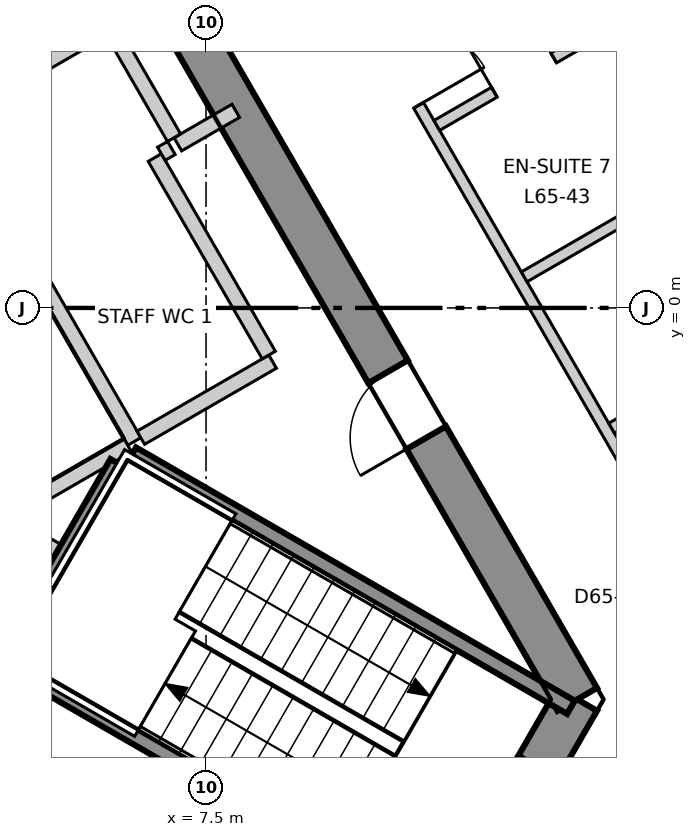
"""IFC4 building model, lengths in metres.
Left out: names, types, materials, properties, quantities, classifications, styles, units other than length and angle.
Written with IfcOpenShell. Run it as: python <this file> out.ifc"""

import sys

from ifc_helpers import new_model, si_unit, direction, frame, frame_2d, origin, place, context, subcontext, project, spatial, polyline, rectangle, outline, extrude, element, fill, save


model = new_model("IFC4")
c1 = context("Model", 3, precision=1e-05, world=origin(), true_north=direction((0.0, 1.0)))
c2 = subcontext(c1, "Body", "Model", "MODEL_VIEW")
j1 = project(units=[si_unit("LENGTHUNIT", "METRE"), si_unit("PLANEANGLEUNIT", "RADIAN")], contexts=[c1])
p1 = place(None, origin())
s1 = spatial("IfcSite", under=j1, at=p1, CompositionType="ELEMENT")
p2 = place(p1, origin())
s2 = spatial("IfcBuilding", under=s1, at=p2, CompositionType="ELEMENT")
p3 = place(p2, frame((0.0, 0.0, 279.1)))
s3 = spatial("IfcBuildingStorey", under=s2, at=p3, CompositionType="ELEMENT", Elevation=279.1)
p4 = place(p3, frame((10.652, -8.15, -0.3), z_axis=(0.0, 0.0, 1.0), x_axis=(0.49997462182, 0.866040055388, 0.0)))
e1 = element("IfcWall", 1, at=p4, inside=s3, PredefinedType="SHEAR", context=c2, shape_type="SweptSolid", body=[
    extrude(outline(polyline([(-0.173, -0.3), (1.732, -0.301), (3.638, -0.301), (3.291, 0.3), (1.732, 0.3), (0.173, 0.3), (-0.173, -0.3)])), origin(), (0.0, 0.0, 1.0), 3.6),
])
p5 = place(p4, frame((1.032, 0.0, 0.3)))
e2 = element("IfcOpeningElement", 2, at=p5, cuts=e1, PredefinedType="OPENING", context=c2, shape_type="SweptSolid", body=[
    extrude(rectangle(XDim=1.4, YDim=2.1, at=frame_2d((0.7, 1.05))), frame((0.0, 0.31, 0.0), z_axis=(0.0, -1.0, 0.0), x_axis=(1.0, 0.0, 0.0)), (0.0, 0.0, 1.0), 0.621),
])
p6 = place(p3, frame((12.384, -5.15, -0.3), z_axis=(0.0, 0.0, 1.0), x_axis=(-0.500000539815, 0.866025092122, 0.0)))
e3 = element("IfcWall", 3, at=p6, inside=s3, PredefinedType="SHEAR", context=c2, shape_type="SweptSolid", body=[
    extrude(outline(polyline([(-0.173, -0.301), (1.795, -0.301), (3.763, -0.301), (5.731, -0.301), (7.7, -0.301), (9.668, -0.301), (11.636, -0.301), (13.604, -0.3), (15.573, -0.3), (17.541, -0.3), (19.509, -0.3), (21.477, -0.3), (21.131, 0.3), (19.226, 0.3), (17.321, 0.3), (15.415, 0.3), (13.51, 0.3), (11.605, 0.3), (9.699, 0.3), (7.794, 0.3), (5.889, 0.3), (3.984, 0.3), (2.078, 0.3), (0.173, 0.3), (-0.173, -0.301)])), origin(), (0.0, 0.0, 1.0), 3.6),
])
p7 = place(p6, frame((16.378, 0.0, 0.3)))
e4 = element("IfcOpeningElement", 4, at=p7, cuts=e3, PredefinedType="OPENING", context=c2, shape_type="SweptSolid", body=[
    extrude(rectangle(XDim=0.9, YDim=2.1, at=frame_2d((0.45, 1.05))), frame((0.0, 0.31, 0.0), z_axis=(0.0, -1.0, 0.0), x_axis=(1.0, 0.0, 0.0)), (0.0, 0.0, 1.0), 0.621),
])
p8 = place(p6, frame((3.976, 0.0, 0.3)))
e5 = element("IfcOpeningElement", 5, at=p8, cuts=e3, PredefinedType="OPENING", context=c2, shape_type="SweptSolid", body=[
    extrude(rectangle(XDim=1.0, YDim=2.1, at=frame_2d((0.5, 1.05))), frame((0.0, 0.31, 0.0), z_axis=(0.0, -1.0, 0.0), x_axis=(1.0, 0.0, 0.0)), (0.0, 0.0, 1.0), 0.621),
])
p9 = place(p3, frame((25.791, -11.962, 0.0), z_axis=(0.0, 0.0, 1.0), x_axis=(-0.500006870765, 0.86602143691, 0.0)))
e6 = element("IfcWall", 6, at=p9, inside=s3, PredefinedType="ELEMENTEDWALL", context=c2, shape_type="SweptSolid", body=[
    extrude(rectangle(XDim=46.49, YDim=0.2, at=frame_2d((23.245, 0.0))), origin(), (0.0, 0.0, 1.0), 3.3),
])
p10 = place(p9, frame((2.197, 0.0, 0.9)))
e7 = element("IfcOpeningElement", 7, at=p10, cuts=e6, PredefinedType="OPENING", context=c2, shape_type="SweptSolid", body=[
    extrude(rectangle(XDim=3.7, YDim=2.2, at=frame_2d((1.85, 1.1))), frame((0.0, 0.11, 0.0), z_axis=(0.0, -1.0, 0.0), x_axis=(1.0, 0.0, 0.0)), (0.0, 0.0, 1.0), 0.22),
])
p11 = place(p9, frame((7.685, 0.0, 0.9)))
e8 = element("IfcOpeningElement", 8, at=p11, cuts=e6, PredefinedType="OPENING", context=c2, shape_type="SweptSolid", body=[
    extrude(rectangle(XDim=3.7, YDim=2.2, at=frame_2d((1.85, 1.1))), frame((0.0, 0.11, 0.0), z_axis=(0.0, -1.0, 0.0), x_axis=(1.0, 0.0, 0.0)), (0.0, 0.0, 1.0), 0.22),
])
p12 = place(p9, frame((13.173, 0.0, 0.9)))
e9 = element("IfcOpeningElement", 9, at=p12, cuts=e6, PredefinedType="OPENING", context=c2, shape_type="SweptSolid", body=[
    extrude(rectangle(XDim=3.7, YDim=2.2, at=frame_2d((1.85, 1.1))), frame((0.0, 0.11, 0.0), z_axis=(0.0, -1.0, 0.0), x_axis=(1.0, 0.0, 0.0)), (0.0, 0.0, 1.0), 0.22),
])
p13 = place(p9, frame((18.661, 0.0, 0.9)))
e10 = element("IfcOpeningElement", 10, at=p13, cuts=e6, PredefinedType="OPENING", context=c2, shape_type="SweptSolid", body=[
    extrude(rectangle(XDim=3.7, YDim=2.2, at=frame_2d((1.85, 1.1))), frame((0.0, 0.11, 0.0), z_axis=(0.0, -1.0, 0.0), x_axis=(1.0, 0.0, 0.0)), (0.0, 0.0, 1.0), 0.22),
])
p14 = place(p9, frame((24.149, 0.0, 0.9)))
e11 = element("IfcOpeningElement", 11, at=p14, cuts=e6, PredefinedType="OPENING", context=c2, shape_type="SweptSolid", body=[
    extrude(rectangle(XDim=3.7, YDim=2.2, at=frame_2d((1.85, 1.1))), frame((0.0, 0.11, 0.0), z_axis=(0.0, -1.0, 0.0), x_axis=(1.0, 0.0, 0.0)), (0.0, 0.0, 1.0), 0.22),
])
p15 = place(p9, frame((29.637, 0.0, 0.9)))
e12 = element("IfcOpeningElement", 12, at=p15, cuts=e6, PredefinedType="OPENING", context=c2, shape_type="SweptSolid", body=[
    extrude(rectangle(XDim=3.7, YDim=2.2, at=frame_2d((1.85, 1.1))), frame((0.0, 0.11, 0.0), z_axis=(0.0, -1.0, 0.0), x_axis=(1.0, 0.0, 0.0)), (0.0, 0.0, 1.0), 0.22),
])
p16 = place(p9, frame((35.125, 0.0, 0.9)))
e13 = element("IfcOpeningElement", 13, at=p16, cuts=e6, PredefinedType="OPENING", context=c2, shape_type="SweptSolid", body=[
    extrude(rectangle(XDim=3.7, YDim=2.2, at=frame_2d((1.85, 1.1))), frame((0.0, 0.11, 0.0), z_axis=(0.0, -1.0, 0.0), x_axis=(1.0, 0.0, 0.0)), (0.0, 0.0, 1.0), 0.22),
])
p17 = place(p9, frame((40.613, 0.0, 0.9)))
e14 = element("IfcOpeningElement", 14, at=p17, cuts=e6, PredefinedType="OPENING", context=c2, shape_type="SweptSolid", body=[
    extrude(rectangle(XDim=3.7, YDim=2.2, at=frame_2d((1.85, 1.1))), frame((0.0, 0.11, 0.0), z_axis=(0.0, -1.0, 0.0), x_axis=(1.0, 0.0, 0.0)), (0.0, 0.0, 1.0), 0.22),
])
p18 = place(p3, frame((0.075, 20.37, 0.0), z_axis=(0.0, 0.0, 1.0), x_axis=(0.500003985697, -0.866023102629, 0.0)))
e15 = element("IfcWall", 15, at=p18, inside=s3, PredefinedType="PARTITIONING", context=c2, shape_type="SweptSolid", body=[
    extrude(rectangle(XDim=35.206, YDim=0.15, at=frame_2d((17.603, 0.0))), origin(), (0.0, 0.0, 1.0), 3.3),
])
p19 = place(p18, frame((31.506, 0.0, 0.0)))
e16 = element("IfcOpeningElement", 16, at=p19, cuts=e15, PredefinedType="OPENING", context=c2, shape_type="SweptSolid", body=[
    extrude(rectangle(XDim=1.0, YDim=2.1, at=frame_2d((0.5, 1.05))), frame((0.0, 0.085, 0.0), z_axis=(0.0, -1.0, 0.0), x_axis=(1.0, 0.0, 0.0)), (0.0, 0.0, 1.0), 0.17),
])
p20 = place(p18, frame((26.529, 0.0, 0.0)))
e17 = element("IfcOpeningElement", 17, at=p20, cuts=e15, PredefinedType="OPENING", context=c2, shape_type="SweptSolid", body=[
    extrude(rectangle(XDim=1.0, YDim=2.1, at=frame_2d((0.5, 1.05))), frame((0.0, 0.085, 0.0), z_axis=(0.0, -1.0, 0.0), x_axis=(1.0, 0.0, 0.0)), (0.0, 0.0, 1.0), 0.17),
])
p21 = place(p18, frame((19.442, 0.0, 0.0)))
e18 = element("IfcOpeningElement", 18, at=p21, cuts=e15, PredefinedType="OPENING", context=c2, shape_type="SweptSolid", body=[
    extrude(rectangle(XDim=1.0, YDim=2.1, at=frame_2d((0.5, 1.05))), frame((0.0, 0.085, 0.0), z_axis=(0.0, -1.0, 0.0), x_axis=(1.0, 0.0, 0.0)), (0.0, 0.0, 1.0), 0.17),
])
p22 = place(p18, frame((8.254, 0.0, 0.0)))
e19 = element("IfcOpeningElement", 19, at=p22, cuts=e15, PredefinedType="OPENING", context=c2, shape_type="SweptSolid", body=[
    extrude(rectangle(XDim=1.0, YDim=2.1, at=frame_2d((0.5, 1.05))), frame((0.0, 0.085, 0.0), z_axis=(0.0, -1.0, 0.0), x_axis=(1.0, 0.0, 0.0)), (0.0, 0.0, 1.0), 0.17),
])
p23 = place(p18, frame((13.754, 0.0, 0.0)))
e20 = element("IfcOpeningElement", 20, at=p23, cuts=e15, PredefinedType="OPENING", context=c2, shape_type="SweptSolid", body=[
    extrude(rectangle(XDim=0.9, YDim=2.1, at=frame_2d((0.45, 1.05))), frame((0.0, 0.085, 0.0), z_axis=(0.0, -1.0, 0.0), x_axis=(1.0, 0.0, 0.0)), (0.0, 0.0, 1.0), 0.17),
])
p24 = place(p18, frame((11.554, 0.0, 0.0)))
e21 = element("IfcOpeningElement", 21, at=p24, cuts=e15, PredefinedType="OPENING", context=c2, shape_type="SweptSolid", body=[
    extrude(rectangle(XDim=0.9, YDim=2.1, at=frame_2d((0.45, 1.05))), frame((0.0, 0.085, 0.0), z_axis=(0.0, -1.0, 0.0), x_axis=(1.0, 0.0, 0.0)), (0.0, 0.0, 1.0), 0.17),
])
p25 = place(p18, frame((2.777, 0.0, 0.0)))
e22 = element("IfcOpeningElement", 22, at=p25, cuts=e15, PredefinedType="OPENING", context=c2, shape_type="SweptSolid", body=[
    extrude(rectangle(XDim=1.0, YDim=2.1, at=frame_2d((0.5, 1.05))), frame((0.0, 0.085, 0.0), z_axis=(0.0, -1.0, 0.0), x_axis=(1.0, 0.0, 0.0)), (0.0, 0.0, 1.0), 0.17),
])
p26 = place(p3, frame((11.686, 0.409, 0.0), z_axis=(0.0, 0.0, 1.0), x_axis=(0.865976450533, 0.500084779935, 0.0)))
e23 = element("IfcWall", 23, at=p26, inside=s3, PredefinedType="PARTITIONING", context=c2, shape_type="SweptSolid", body=[
    extrude(rectangle(XDim=5.949, YDim=0.15, at=frame_2d((2.975, 0.0))), origin(), (0.0, 0.0, 1.0), 3.3),
])
p27 = place(p3, frame((12.809, 3.714, 0.0), z_axis=(0.0, 0.0, 1.0), x_axis=(0.500162441854, -0.865931597621, 0.0)))
e24 = element("IfcWall", 24, at=p27, inside=s3, PredefinedType="PARTITIONING", context=c2, shape_type="SweptSolid", body=[
    extrude(rectangle(XDim=2.225, YDim=0.15, at=frame_2d((1.113, 0.0))), origin(), (0.0, 0.0, 1.0), 3.3),
])
p28 = place(p3, frame((12.836, -1.582, 0.0), z_axis=(0.0, 0.0, 1.0), x_axis=(0.865965520905, 0.500103705848, 0.0)))
e25 = element("IfcWall", 25, at=p28, inside=s3, PredefinedType="PARTITIONING", context=c2, shape_type="SweptSolid", body=[
    extrude(rectangle(XDim=2.55, YDim=0.15, at=frame_2d((1.275, 0.0))), origin(), (0.0, 0.0, 1.0), 3.3),
])
p29 = place(p28, frame((0.775, 0.0, 0.0)))
e26 = element("IfcOpeningElement", 26, at=p29, cuts=e25, PredefinedType="OPENING", context=c2, shape_type="SweptSolid", body=[
    extrude(rectangle(XDim=0.9, YDim=2.1, at=frame_2d((0.45, 1.05))), frame((0.0, 0.085, 0.0), z_axis=(0.0, -1.0, 0.0), x_axis=(1.0, 0.0, 0.0)), (0.0, 0.0, 1.0), 0.17),
])
p30 = place(p3, frame((10.536, 2.401, 0.0), z_axis=(0.0, 0.0, 1.0), x_axis=(0.865965520905, 0.500103705848, 0.0)))
e27 = element("IfcWall", 27, at=p30, inside=s3, PredefinedType="PARTITIONING", context=c2, shape_type="SweptSolid", body=[
    extrude(rectangle(XDim=2.55, YDim=0.15, at=frame_2d((1.275, 0.0))), origin(), (0.0, 0.0, 1.0), 3.3),
])
p31 = place(p30, frame((0.875, 0.0, 0.0)))
e28 = element("IfcOpeningElement", 28, at=p31, cuts=e27, PredefinedType="OPENING", context=c2, shape_type="SweptSolid", body=[
    extrude(rectangle(XDim=0.9, YDim=2.1, at=frame_2d((0.45, 1.05))), frame((0.0, 0.085, 0.0), z_axis=(0.0, -1.0, 0.0), x_axis=(1.0, 0.0, 0.0)), (0.0, 0.0, 1.0), 0.17),
])
p32 = place(p3, frame((1.578, 2.874, 0.0), z_axis=(0.0, 0.0, 1.0), x_axis=(0.866045911672, 0.499964477614, 0.0)))
e29 = element("IfcWall", 29, at=p32, inside=s3, PredefinedType="SOLIDWALL", context=c2, shape_type="SweptSolid", body=[
    extrude(rectangle(XDim=5.327, YDim=0.2, at=frame_2d((2.663, 0.0))), origin(), (0.0, 0.0, 1.0), 3.3),
])
p33 = place(p32, frame((2.496, 0.0, 0.0)))
e30 = element("IfcOpeningElement", 30, at=p33, cuts=e29, PredefinedType="OPENING", context=c2, shape_type="SweptSolid", body=[
    extrude(rectangle(XDim=1.1, YDim=2.1, at=frame_2d((0.55, 1.05))), frame((0.0, 0.11, 0.0), z_axis=(0.0, -1.0, 0.0), x_axis=(1.0, 0.0, 0.0)), (0.0, 0.0, 1.0), 0.22),
])
p34 = place(p3, frame((7.129, 2.153, 0.0), z_axis=(0.0, 0.0, 1.0), x_axis=(0.866083962871, 0.499898558967, 0.0)))
e31 = element("IfcWall", 31, at=p34, inside=s3, PredefinedType="SOLIDWALL", context=c2, shape_type="SweptSolid", body=[
    extrude(rectangle(XDim=0.88, YDim=0.2, at=frame_2d((0.44, 0.0))), origin(), (0.0, 0.0, 1.0), 3.3),
])
p35 = place(p3, frame((5.057, 0.841, 0.0), z_axis=(0.0, 0.0, 1.0), x_axis=(0.499990139034, -0.866031096941, 0.0)))
e32 = element("IfcWall", 32, at=p35, inside=s3, PredefinedType="SOLIDWALL", context=c2, shape_type="SweptSolid", body=[
    extrude(rectangle(XDim=3.0, YDim=0.2, at=frame_2d((1.5, 0.0))), origin(), (0.0, 0.0, 1.0), 3.3),
])
p36 = place(p3, frame((4.9, -2.714, 0.0), z_axis=(0.0, 0.0, 1.0), x_axis=(0.865846928409, 0.500309001083, 0.0)))
e33 = element("IfcWall", 33, at=p36, inside=s3, PredefinedType="SOLIDWALL", context=c2, shape_type="SweptSolid", body=[
    extrude(rectangle(XDim=1.813, YDim=0.2, at=frame_2d((0.907, 0.0))), origin(), (0.0, 0.0, 1.0), 3.3),
])
p37 = place(p3, frame((6.229, 3.712, 0.0), z_axis=(0.0, 0.0, 1.0), x_axis=(0.499875724984, -0.86609714211, 0.0)))
e34 = element("IfcWall", 34, at=p37, inside=s3, PredefinedType="SOLIDWALL", context=c2, shape_type="SweptSolid", body=[
    extrude(rectangle(XDim=1.701, YDim=0.2, at=frame_2d((0.85, 0.0))), origin(), (0.0, 0.0, 1.0), 3.3),
])
p38 = place(p3, frame((2.548, 1.587, 0.0), z_axis=(0.0, 0.0, 1.0), x_axis=(0.866004344652, 0.500036473714, 0.0)))
e35 = element("IfcWall", 35, at=p38, inside=s3, PredefinedType="SOLIDWALL", context=c2, shape_type="SweptSolid", body=[
    extrude(rectangle(XDim=4.15, YDim=0.2, at=frame_2d((2.075, 0.0))), origin(), (0.0, 0.0, 1.0), 3.3),
])
p39 = place(p38, frame((1.675, 0.0, 0.0)))
e36 = element("IfcOpeningElement", 36, at=p39, cuts=e35, PredefinedType="OPENING", context=c2, shape_type="SweptSolid", body=[
    extrude(rectangle(XDim=0.9, YDim=2.1, at=frame_2d((0.45, 1.05))), frame((0.0, 0.11, 0.0), z_axis=(0.0, -1.0, 0.0), x_axis=(1.0, 0.0, 0.0)), (0.0, 0.0, 1.0), 0.22),
])
p40 = place(p3, frame((4.9, -2.829, 0.0), z_axis=(0.0, 0.0, 1.0), x_axis=(0.866273177064, -0.499570598314, 0.0)))
e37 = element("IfcWall", 37, at=p40, inside=s3, PredefinedType="SOLIDWALL", context=c2, shape_type="SweptSolid", body=[
    extrude(rectangle(XDim=0.742, YDim=0.2, at=frame_2d((0.371, 0.0))), origin(), (0.0, 0.0, 1.0), 3.3),
])
p41 = place(p3, frame((6.642, -1.708, 0.0), z_axis=(0.0, 0.0, 1.0), x_axis=(0.866043441391, 0.499968756647, 0.0)))
e38 = element("IfcWall", 38, at=p41, inside=s3, PredefinedType="SOLIDWALL", context=c2, shape_type="SweptSolid", body=[
    extrude(rectangle(XDim=2.002, YDim=0.2, at=frame_2d((1.001, 0.0))), origin(), (0.0, 0.0, 1.0), 3.3),
])
p42 = place(p3, frame((6.826, 1.978, 0.0), z_axis=(0.0, 0.0, 1.0), x_axis=(0.499990139034, -0.866031096941, 0.0)))
e39 = element("IfcWall", 39, at=p42, inside=s3, PredefinedType="SOLIDWALL", context=c2, shape_type="SweptSolid", body=[
    extrude(rectangle(XDim=3.0, YDim=0.2, at=frame_2d((1.5, 0.0))), origin(), (0.0, 0.0, 1.0), 3.3),
])
p43 = place(p3, frame((6.912, 2.028, 0.0), z_axis=(0.0, 0.0, 1.0), x_axis=(0.866559367082, 0.499074005857, 0.0)))
e40 = element("IfcWall", 40, at=p43, inside=s3, PredefinedType="SOLIDWALL", context=c2, shape_type="SweptSolid", body=[
    extrude(rectangle(XDim=0.152, YDim=0.2, at=frame_2d((0.076, 0.0))), origin(), (0.0, 0.0, 1.0), 3.3),
])
p44 = place(p3, frame((4.929, -4.462, 0.0), z_axis=(0.0, 0.0, 1.0), x_axis=(0.500200581029, 0.865909567298, 0.0)))
e41 = element("IfcWall", 41, at=p44, inside=s3, PredefinedType="SOLIDWALL", context=c2, shape_type="SweptSolid", body=[
    extrude(rectangle(XDim=2.799, YDim=0.2, at=frame_2d((1.399, 0.0))), origin(), (0.0, 0.0, 1.0), 3.3),
])
p45 = place(p3, frame((6.529, -1.922, 0.0), z_axis=(0.0, 0.0, 1.0), x_axis=(0.866068467981, -0.499925403204, 0.0)))
e42 = element("IfcWall", 42, at=p45, inside=s3, PredefinedType="SOLIDWALL", context=c2, shape_type="SweptSolid", body=[
    extrude(rectangle(XDim=6.665, YDim=0.2, at=frame_2d((3.332, 0.0))), origin(), (0.0, 0.0, 1.0), 3.3),
])
p46 = place(p3, frame((4.929, -4.693, 0.0), z_axis=(0.0, 0.0, 1.0), x_axis=(0.866005022404, -0.500035299925, 0.0)))
e43 = element("IfcWall", 43, at=p46, inside=s3, PredefinedType="SOLIDWALL", context=c2, shape_type="SweptSolid", body=[
    extrude(rectangle(XDim=6.665, YDim=0.2, at=frame_2d((3.333, 0.0))), origin(), (0.0, 0.0, 1.0), 3.3),
])
p47 = place(p21, origin())
e44 = element("IfcDoor", 44, at=p47, inside=s3, OperationType="SINGLE_SWING_LEFT", PredefinedType="DOOR", context=c2, shape_type="SweptSolid", body=[
    extrude(rectangle(XDim=1.0, YDim=2.1, at=frame_2d((0.5, 1.05))), frame((0.0, 0.025, 0.0), z_axis=(0.0, -1.0, 0.0), x_axis=(1.0, 0.0, 0.0)), (0.0, 0.0, 1.0), 0.05),
])
fill(e18, e44)
p48 = place(p31, origin())
e45 = element("IfcDoor", 45, at=p48, inside=s3, OperationType="SINGLE_SWING_RIGHT", PredefinedType="DOOR", context=c2, shape_type="SweptSolid", body=[
    extrude(rectangle(XDim=0.9, YDim=2.1, at=frame_2d((0.45, 1.05))), frame((0.0, 0.025, 0.0), z_axis=(0.0, -1.0, 0.0), x_axis=(1.0, 0.0, 0.0)), (0.0, 0.0, 1.0), 0.05),
])
fill(e28, e45)
p49 = place(p8, origin())
e46 = element("IfcDoor", 46, at=p49, inside=s3, OperationType="SINGLE_SWING_RIGHT", PredefinedType="DOOR", context=c2, shape_type="SweptSolid", body=[
    extrude(rectangle(XDim=1.0, YDim=2.1, at=frame_2d((0.5, 1.05))), frame((0.0, 0.025, 0.0), z_axis=(0.0, -1.0, 0.0), x_axis=(1.0, 0.0, 0.0)), (0.0, 0.0, 1.0), 0.05),
])
fill(e5, e46)
save(model, sys.argv[1])
